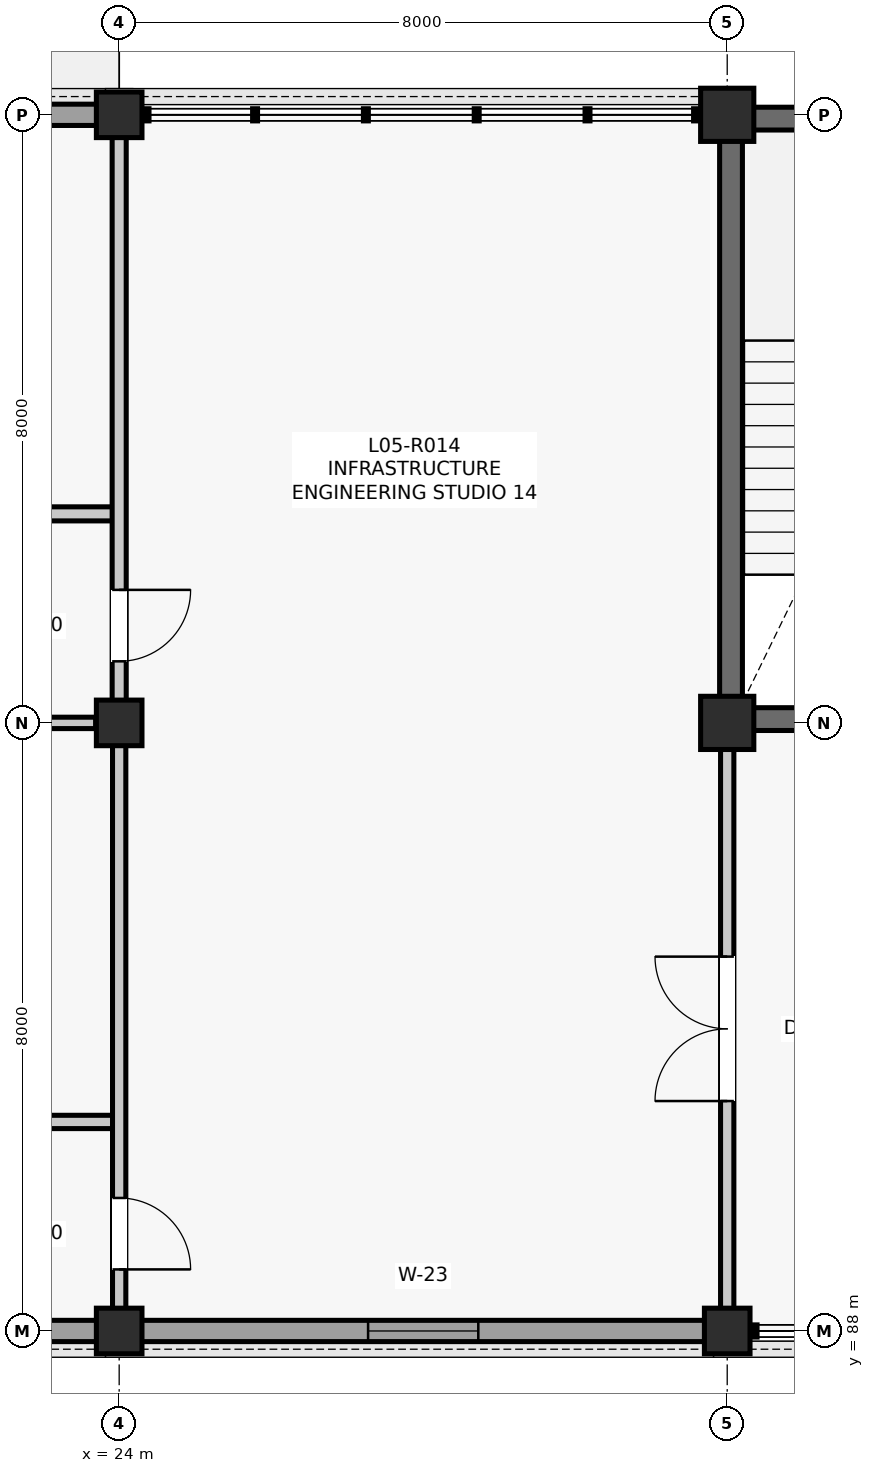
"""IFC4 building model, lengths in metres.
Left out: names, types, materials, properties, quantities, classifications, styles, units other than length and angle.
Written with IfcOpenShell. Run it as: python <this file> out.ifc"""

import sys

from ifc_helpers import new_model, si_unit, direction, frame, frame_2d, origin, origin_2d, place, context, subcontext, project, spatial, rectangle, extrude, element, fill, save


model = new_model("IFC4")
c1 = context("Model", 3, precision=1e-05, world=origin(), true_north=direction((0.0, 1.0)))
c2 = subcontext(c1, "Body", "Model", "MODEL_VIEW")
j1 = project(units=[si_unit("LENGTHUNIT", "METRE"), si_unit("PLANEANGLEUNIT", "RADIAN")], contexts=[c1])
p1 = place(None, origin())
s1 = spatial("IfcSite", under=j1, at=p1, CompositionType="ELEMENT")
p2 = place(p1, origin())
s2 = spatial("IfcBuilding", under=s1, at=p2, CompositionType="ELEMENT")
p3 = place(p2, frame((0.0, 0.0, 21.78)))
s3 = spatial("IfcBuildingStorey", under=s2, at=p3, CompositionType="ELEMENT", Elevation=21.78)
for number, where, z_axis, x_axis in (
    (1, (24.0, 88.0, 0.0), (0.0, 0.0, 1.0), (1.0, 0.0, 0.0)),
    (2, (24.0, 96.0, 0.0), (0.0, 0.0, 1.0), (1.0, 0.0, 0.0)),
    (3, (24.0, 104.0, 0.0), (0.0, 0.0, 1.0), (1.0, 0.0, 0.0)),
    (4, (32.0, 88.0, 0.0), (0.0, 0.0, 1.0), (1.0, 0.0, 0.0)),
):
    element("IfcColumn", number, at=place(p3, frame(where, z_axis=z_axis, x_axis=x_axis)), inside=s3, PredefinedType="COLUMN", context=c2, shape_type="SweptSolid", body=[
        extrude(rectangle(XDim=0.6, YDim=0.6, at=origin_2d()), origin(), (0.0, 0.0, 1.0), 3.96),
    ])
for number, where, z_axis, x_axis in (
    (5, (32.0, 96.0, 0.0), (0.0, 0.0, 1.0), (1.0, 0.0, 0.0)),
    (6, (32.0, 104.0, 0.0), (0.0, 0.0, 1.0), (1.0, 0.0, 0.0)),
):
    element("IfcColumn", number, at=place(p3, frame(where, z_axis=z_axis, x_axis=x_axis)), inside=s3, PredefinedType="COLUMN", context=c2, shape_type="SweptSolid", body=[
        extrude(rectangle(XDim=0.7, YDim=0.7, at=origin_2d()), origin(), (0.0, 0.0, 1.0), 3.96),
    ])
p4 = place(p3, frame((16.335, 88.0, 0.0), z_axis=(0.0, 0.0, 1.0), x_axis=(1.0, 0.0, 0.0)))
e7 = element("IfcWall", 7, at=p4, inside=s3, PredefinedType="SOLIDWALL", context=c2, shape_type="SweptSolid", body=[
    extrude(rectangle(XDim=7.38, YDim=0.28, at=frame_2d((3.69, 0.0))), origin(), (0.0, 0.0, 1.0), 3.309),
])
p5 = place(p4, frame((0.753, 0.0, 0.95)))
e8 = element("IfcOpeningElement", 8, at=p5, cuts=e7, PredefinedType="OPENING", context=c2, shape_type="SweptSolid", body=[
    extrude(rectangle(XDim=1.15, YDim=1.65, at=frame_2d((0.575, 0.825))), frame((0.0, 0.15, 0.0), z_axis=(0.0, -1.0, 0.0), x_axis=(1.0, 0.0, 0.0)), (0.0, 0.0, 1.0), 0.3),
])
p6 = place(p4, frame((5.477, 0.0, 0.95)))
e9 = element("IfcOpeningElement", 9, at=p6, cuts=e7, PredefinedType="OPENING", context=c2, shape_type="SweptSolid", body=[
    extrude(rectangle(XDim=1.15, YDim=1.65, at=frame_2d((0.575, 0.825))), frame((0.0, 0.15, 0.0), z_axis=(0.0, -1.0, 0.0), x_axis=(1.0, 0.0, 0.0)), (0.0, 0.0, 1.0), 0.3),
])
p7 = place(p3, frame((16.285, 104.0, 0.0), z_axis=(0.0, 0.0, 1.0), x_axis=(1.0, 0.0, 0.0)))
e10 = element("IfcWall", 10, at=p7, inside=s3, PredefinedType="SOLIDWALL", context=c2, shape_type="SweptSolid", body=[
    extrude(rectangle(XDim=7.43, YDim=0.28, at=frame_2d((3.715, 0.0))), origin(), (0.0, 0.0, 1.0), 3.469),
])
p8 = place(p7, frame((0.662, 0.0, 0.95)))
e11 = element("IfcOpeningElement", 11, at=p8, cuts=e10, PredefinedType="OPENING", context=c2, shape_type="SweptSolid", body=[
    extrude(rectangle(XDim=1.35, YDim=1.9, at=frame_2d((0.675, 0.95))), frame((0.0, 0.15, 0.0), z_axis=(0.0, -1.0, 0.0), x_axis=(1.0, 0.0, 0.0)), (0.0, 0.0, 1.0), 0.3),
])
p9 = place(p7, frame((5.417, 0.0, 0.95)))
e12 = element("IfcOpeningElement", 12, at=p9, cuts=e10, PredefinedType="OPENING", context=c2, shape_type="SweptSolid", body=[
    extrude(rectangle(XDim=1.35, YDim=1.9, at=frame_2d((0.675, 0.95))), frame((0.0, 0.15, 0.0), z_axis=(0.0, -1.0, 0.0), x_axis=(1.0, 0.0, 0.0)), (0.0, 0.0, 1.0), 0.3),
])
p10 = place(p3, frame((24.285, 88.0, 0.0), z_axis=(0.0, 0.0, 1.0), x_axis=(1.0, 0.0, 0.0)))
e13 = element("IfcWall", 13, at=p10, inside=s3, PredefinedType="SOLIDWALL", context=c2, shape_type="SweptSolid", body=[
    extrude(rectangle(XDim=7.43, YDim=0.28, at=frame_2d((3.715, 0.0))), origin(), (0.0, 0.0, 1.0), 3.372),
])
p11 = place(p10, frame((2.99, 0.0, 0.9)))
e14 = element("IfcOpeningElement", 14, at=p11, cuts=e13, PredefinedType="OPENING", context=c2, shape_type="SweptSolid", body=[
    extrude(rectangle(XDim=1.45, YDim=2.15, at=frame_2d((0.725, 1.075))), frame((0.0, 0.15, 0.0), z_axis=(0.0, -1.0, 0.0), x_axis=(1.0, 0.0, 0.0)), (0.0, 0.0, 1.0), 0.3),
])
for number, where, z_axis, x_axis in (
    (15, (32.05, 96.24, 0.0), (0.0, 0.0, 1.0), (0.0, 1.0, 0.0)),
    (16, (32.24, 103.95, 0.0), (0.0, 0.0, 1.0), (1.0, 0.0, 0.0)),
):
    element("IfcWall", number, at=place(p3, frame(where, z_axis=z_axis, x_axis=x_axis)), inside=s3, PredefinedType="SHEAR", context=c2, shape_type="SweptSolid", body=[
        extrude(rectangle(XDim=7.52, YDim=0.3, at=frame_2d((3.76, 0.0))), origin(), (0.0, 0.0, 1.0), 3.735),
    ])
p12 = place(p3, frame((32.24, 96.05, 0.0), z_axis=(0.0, 0.0, 1.0), x_axis=(1.0, 0.0, 0.0)))
e17 = element("IfcWall", 17, at=p12, inside=s3, PredefinedType="SHEAR", context=c2, shape_type="SweptSolid", body=[
    extrude(rectangle(XDim=3.91, YDim=0.3, at=frame_2d((1.955, 0.0))), origin(), (0.0, 0.0, 1.0), 3.735),
])
p13 = place(p3, frame((18.7, 90.75, 0.0), z_axis=(0.0, 0.0, 1.0), x_axis=(1.0, 0.0, 0.0)))
e18 = element("IfcWall", 18, at=p13, inside=s3, PredefinedType="PARTITIONING", context=c2, shape_type="SweptSolid", body=[
    extrude(rectangle(XDim=5.28, YDim=0.175, at=frame_2d((2.64, 0.0))), origin(), (0.0, 0.0, 1.0), 3.405),
])
p14 = place(p13, frame((2.17, 0.0, 0.0)))
e19 = element("IfcOpeningElement", 19, at=p14, cuts=e18, PredefinedType="OPENING", context=c2, shape_type="SweptSolid", body=[
    extrude(rectangle(XDim=0.94, YDim=2.12, at=frame_2d((0.47, 1.06))), frame((0.0, 0.097, 0.0), z_axis=(0.0, -1.0, 0.0), x_axis=(1.0, 0.0, 0.0)), (0.0, 0.0, 1.0), 0.195),
])
p15 = place(p3, frame((18.75, 96.0, 0.0), z_axis=(0.0, 0.0, 1.0), x_axis=(1.0, 0.0, 0.0)))
e20 = element("IfcWall", 20, at=p15, inside=s3, PredefinedType="PARTITIONING", context=c2, shape_type="SweptSolid", body=[
    extrude(rectangle(XDim=4.94, YDim=0.15, at=frame_2d((2.47, 0.0))), origin(), (0.0, 0.0, 1.0), 3.251),
])
p16 = place(p3, frame((18.7, 98.75, 0.0), z_axis=(0.0, 0.0, 1.0), x_axis=(1.0, 0.0, 0.0)))
e21 = element("IfcWall", 21, at=p16, inside=s3, PredefinedType="PARTITIONING", context=c2, shape_type="SweptSolid", body=[
    extrude(rectangle(XDim=5.28, YDim=0.185, at=frame_2d((2.64, 0.0))), origin(), (0.0, 0.0, 1.0), 3.257),
])
p17 = place(p16, frame((2.115, 0.0, 0.0)))
e22 = element("IfcOpeningElement", 22, at=p17, cuts=e21, PredefinedType="OPENING", context=c2, shape_type="SweptSolid", body=[
    extrude(rectangle(XDim=1.05, YDim=2.15, at=frame_2d((0.525, 1.075))), frame((0.0, 0.103, 0.0), z_axis=(0.0, -1.0, 0.0), x_axis=(1.0, 0.0, 0.0)), (0.0, 0.0, 1.0), 0.205),
])
p18 = place(p3, frame((24.0, 88.29, 0.0), z_axis=(0.0, 0.0, 1.0), x_axis=(0.0, 1.0, 0.0)))
e23 = element("IfcWall", 23, at=p18, inside=s3, PredefinedType="PARTITIONING", context=c2, shape_type="SweptSolid", body=[
    extrude(rectangle(XDim=7.42, YDim=0.175, at=frame_2d((3.71, 0.0))), origin(), (0.0, 0.0, 1.0), 3.457),
])
p19 = place(p18, frame((0.52, 0.0, 0.0)))
e24 = element("IfcOpeningElement", 24, at=p19, cuts=e23, PredefinedType="OPENING", context=c2, shape_type="SweptSolid", body=[
    extrude(rectangle(XDim=0.94, YDim=2.12, at=frame_2d((0.47, 1.06))), frame((0.0, 0.097, 0.0), z_axis=(0.0, -1.0, 0.0), x_axis=(1.0, 0.0, 0.0)), (0.0, 0.0, 1.0), 0.195),
])
p20 = place(p3, frame((24.0, 96.29, 0.0), z_axis=(0.0, 0.0, 1.0), x_axis=(0.0, 1.0, 0.0)))
e25 = element("IfcWall", 25, at=p20, inside=s3, PredefinedType="PARTITIONING", context=c2, shape_type="SweptSolid", body=[
    extrude(rectangle(XDim=7.42, YDim=0.185, at=frame_2d((3.71, 0.0))), origin(), (0.0, 0.0, 1.0), 3.257),
])
p21 = place(p20, frame((0.52, 0.0, 0.0)))
e26 = element("IfcOpeningElement", 26, at=p21, cuts=e25, PredefinedType="OPENING", context=c2, shape_type="SweptSolid", body=[
    extrude(rectangle(XDim=0.94, YDim=2.12, at=frame_2d((0.47, 1.06))), frame((0.0, 0.103, 0.0), z_axis=(0.0, -1.0, 0.0), x_axis=(1.0, 0.0, 0.0)), (0.0, 0.0, 1.0), 0.205),
])
p22 = place(p3, frame((32.0, 88.29, 0.0), z_axis=(0.0, 0.0, 1.0), x_axis=(0.0, 1.0, 0.0)))
e27 = element("IfcWall", 27, at=p22, inside=s3, PredefinedType="PARTITIONING", context=c2, shape_type="SweptSolid", body=[
    extrude(rectangle(XDim=7.37, YDim=0.175, at=frame_2d((3.685, 0.0))), origin(), (0.0, 0.0, 1.0), 3.252),
])
p23 = place(p22, frame((2.735, 0.0, 0.0)))
e28 = element("IfcOpeningElement", 28, at=p23, cuts=e27, PredefinedType="OPENING", context=c2, shape_type="SweptSolid", body=[
    extrude(rectangle(XDim=1.9, YDim=2.38, at=frame_2d((0.95, 1.19))), frame((0.0, 0.097, 0.0), z_axis=(0.0, -1.0, 0.0), x_axis=(1.0, 0.0, 0.0)), (0.0, 0.0, 1.0), 0.195),
])
p24 = place(p11, origin())
e29 = element("IfcWindow", 29, at=p24, inside=s3, PartitioningType="SINGLE_PANEL", PredefinedType="WINDOW", context=c2, shape_type="SweptSolid", body=[
    extrude(rectangle(XDim=1.45, YDim=2.15, at=frame_2d((0.725, 1.075))), frame((0.0, 0.03, 0.0), z_axis=(0.0, -1.0, 0.0), x_axis=(1.0, 0.0, 0.0)), (0.0, 0.0, 1.0), 0.06),
])
fill(e14, e29)
p25 = place(p19, frame((0.94, 0.0, 0.0), z_axis=(0.0, 0.0, 1.0), x_axis=(-1.0, 0.0, 0.0)))
e30 = element("IfcDoor", 30, at=p25, inside=s3, OperationType="SINGLE_SWING_LEFT", PredefinedType="DOOR", context=c2, shape_type="SweptSolid", body=[
    extrude(rectangle(XDim=0.94, YDim=2.12, at=frame_2d((0.47, 1.06))), frame((0.0, 0.025, 0.0), z_axis=(0.0, -1.0, 0.0), x_axis=(1.0, 0.0, 0.0)), (0.0, 0.0, 1.0), 0.05),
])
fill(e24, e30)
p26 = place(p21, frame((0.94, 0.0, 0.0), z_axis=(0.0, 0.0, 1.0), x_axis=(-1.0, 0.0, 0.0)))
e31 = element("IfcDoor", 31, at=p26, inside=s3, OperationType="SINGLE_SWING_RIGHT", PredefinedType="DOOR", context=c2, shape_type="SweptSolid", body=[
    extrude(rectangle(XDim=0.94, YDim=2.12, at=frame_2d((0.47, 1.06))), frame((0.0, 0.025, 0.0), z_axis=(0.0, -1.0, 0.0), x_axis=(1.0, 0.0, 0.0)), (0.0, 0.0, 1.0), 0.05),
])
fill(e26, e31)
p27 = place(p23, origin())
e32 = element("IfcDoor", 32, at=p27, inside=s3, OperationType="DOUBLE_DOOR_SINGLE_SWING", PredefinedType="DOOR", context=c2, shape_type="SweptSolid", body=[
    extrude(rectangle(XDim=1.9, YDim=2.38, at=frame_2d((0.95, 1.19))), frame((0.0, 0.025, 0.0), z_axis=(0.0, -1.0, 0.0), x_axis=(1.0, 0.0, 0.0)), (0.0, 0.0, 1.0), 0.05),
])
fill(e28, e32)
save(model, sys.argv[1])
